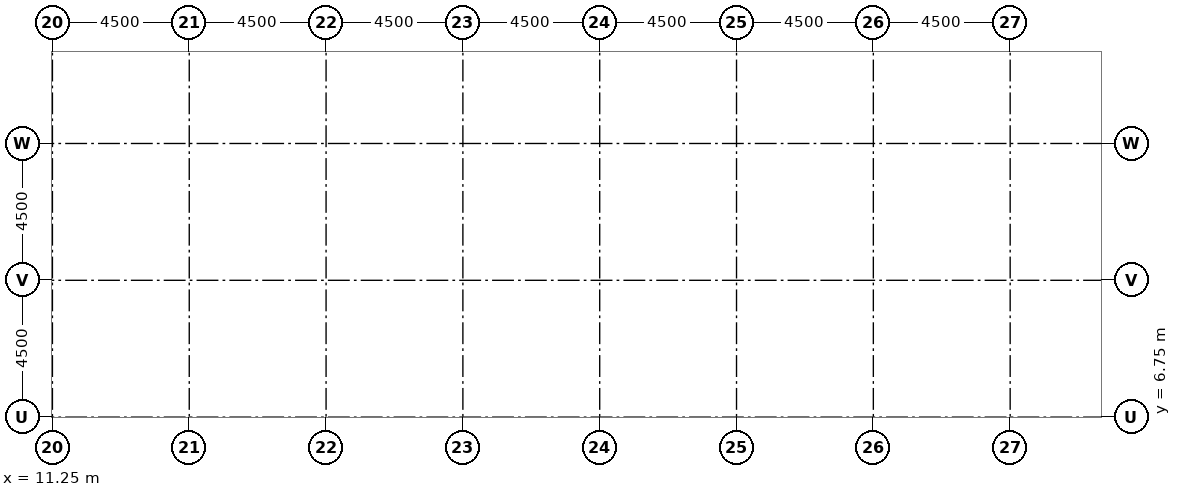
"""IFC4 building model, lengths in metres.
Left out: names, types, materials, properties, quantities, classifications, styles, units other than length and angle.
Written with IfcOpenShell. Run it as: python <this file> out.ifc"""

import sys

from ifc_helpers import new_model, si_unit, direction, frame, origin, origin_2d, place, context, subcontext, project, spatial, rectangle, extrude, element, save


model = new_model("IFC4")
c1 = context("Model", 3, precision=1e-05, world=origin(), true_north=direction((0.0, 1.0)))
c2 = subcontext(c1, "Body", "Model", "MODEL_VIEW")
j1 = project(units=[si_unit("LENGTHUNIT", "METRE"), si_unit("PLANEANGLEUNIT", "RADIAN")], contexts=[c1])
p1 = place(None, origin())
s1 = spatial("IfcSite", under=j1, at=p1, CompositionType="ELEMENT")
p2 = place(p1, origin())
s2 = spatial("IfcBuilding", under=s1, at=p2, CompositionType="ELEMENT")
p3 = place(p2, frame((0.0, 0.0, -8.0)))
s3 = spatial("IfcBuildingStorey", under=s2, at=p3, CompositionType="ELEMENT", Elevation=-8.0)
for number, where, z_axis, x_axis in (
    (1, (10.75, 6.25, 0.0), (0.0, 0.0, 1.0), (1.0, 0.0, 0.0)),
    (2, (15.75, 6.25, 0.0), (0.0, 0.0, 1.0), (1.0, 0.0, 0.0)),
    (3, (40.5, 10.5, 0.0), (0.0, 0.0, 1.0), (1.0, 0.0, 0.0)),
):
    element("IfcColumn", number, at=place(p3, frame(where, z_axis=z_axis, x_axis=x_axis)), inside=s3, PredefinedType="COLUMN", context=c2, shape_type="SweptSolid", body=[
        extrude(rectangle(XDim=1.2, YDim=1.2, at=origin_2d()), origin(), (0.0, 0.0, 1.0), 3.4),
    ])
save(model, sys.argv[1])
